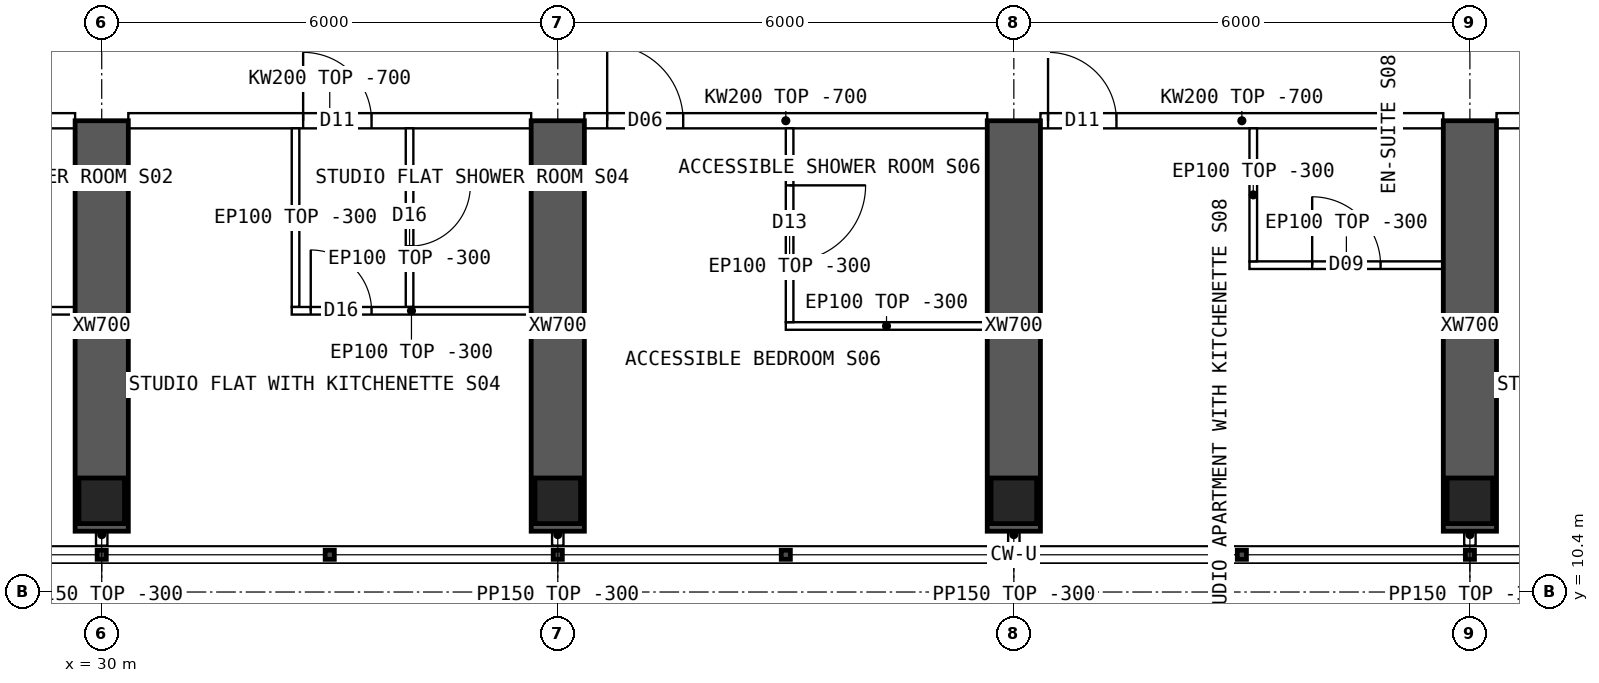
"""IFC4 building model, lengths in metres.
Left out: names, types, materials, properties, quantities, classifications, styles, units other than length and angle.
Written with IfcOpenShell. Run it as: python <this file> out.ifc"""

import sys

from ifc_helpers import new_model, si_unit, direction, frame, frame_2d, origin, origin_2d, place, context, subcontext, project, spatial, polyline, rectangle, hollow_rectangle, outline, extrude, element, fill, save


model = new_model("IFC4")
c1 = context("Model", 3, precision=1e-05, world=origin(), true_north=direction((0.0, 1.0)))
c2 = subcontext(c1, "Body", "Model", "MODEL_VIEW")
j1 = project(units=[si_unit("LENGTHUNIT", "METRE"), si_unit("PLANEANGLEUNIT", "RADIAN")], contexts=[c1])
p1 = place(None, origin())
s1 = spatial("IfcSite", under=j1, at=p1, CompositionType="ELEMENT")
p2 = place(p1, origin())
s2 = spatial("IfcBuilding", under=s1, at=p2, CompositionType="ELEMENT")
p3 = place(p2, frame((0.0, 0.0, 254.05)))
s3 = spatial("IfcBuildingStorey", under=s2, at=p3, CompositionType="ELEMENT", Elevation=254.05)
for number, where, z_axis, x_axis in (
    (1, (30.0, 11.6, 0.0), (0.0, 0.0, 1.0), (1.0, 0.0, 0.0)),
    (2, (36.0, 11.6, 0.0), (0.0, 0.0, 1.0), (1.0, 0.0, 0.0)),
    (3, (42.0, 11.6, 0.0), (0.0, 0.0, 1.0), (1.0, 0.0, 0.0)),
    (4, (48.0, 11.6, 0.0), (0.0, 0.0, 1.0), (1.0, 0.0, 0.0)),
):
    element("IfcColumn", number, at=place(p3, frame(where, z_axis=z_axis, x_axis=x_axis)), inside=s3, PredefinedType="COLUMN", context=c2, shape_type="SweptSolid", body=[
        extrude(hollow_rectangle(XDim=0.6, YDim=0.6, WallThickness=0.06, at=origin_2d()), origin(), (0.0, 0.0, 1.0), 3.75),
    ])
for number, where, z_axis, x_axis in (
    (5, (30.0, 11.2, 0.0), (0.0, 0.0, 1.0), (0.0, 1.0, 0.0)),
    (6, (36.0, 11.2, 0.0), (0.0, 0.0, 1.0), (0.0, 1.0, 0.0)),
    (7, (42.0, 11.2, 0.0), (0.0, 0.0, 1.0), (0.0, 1.0, 0.0)),
    (8, (48.0, 11.2, 0.0), (0.0, 0.0, 1.0), (0.0, 1.0, 0.0)),
):
    element("IfcWall", number, at=place(p3, frame(where, z_axis=z_axis, x_axis=x_axis)), inside=s3, PredefinedType="SHEAR", context=c2, shape_type="SweptSolid", body=[
        extrude(rectangle(XDim=5.4, YDim=0.7, at=frame_2d((2.7, 0.0))), origin(), (0.0, 0.0, 1.0), 3.75),
    ])
p4 = place(p3, frame((24.35, 16.6, 0.0), z_axis=(0.0, 0.0, 1.0), x_axis=(1.0, 0.0, 0.0)))
e9 = element("IfcWall", 9, at=p4, inside=s3, PredefinedType="SOLIDWALL", context=c2, shape_type="SweptSolid", body=[
    extrude(outline(polyline([(0.0, 0.0), (5.3, 0.0), (5.3, 3.05), (0.0, 3.05), (0.0, 0.0)])), frame((0.0, 0.1, 0.0), z_axis=(0.0, -1.0, 0.0), x_axis=(1.0, 0.0, 0.0)), (0.0, 0.0, 1.0), 0.2),
])
p5 = place(p4, frame((2.3, 0.0, 0.0)))
e10 = element("IfcOpeningElement", 10, at=p5, cuts=e9, PredefinedType="OPENING", context=c2, shape_type="SweptSolid", body=[
    extrude(rectangle(XDim=0.9, YDim=2.1, at=frame_2d((0.45, 1.05))), frame((0.0, 0.11, 0.0), z_axis=(0.0, -1.0, 0.0), x_axis=(1.0, 0.0, 0.0)), (0.0, 0.0, 1.0), 0.22),
])
p6 = place(p3, frame((30.35, 16.6, 0.0), z_axis=(0.0, 0.0, 1.0), x_axis=(1.0, 0.0, 0.0)))
e11 = element("IfcWall", 11, at=p6, inside=s3, PredefinedType="SOLIDWALL", context=c2, shape_type="SweptSolid", body=[
    extrude(outline(polyline([(0.0, 0.0), (5.3, 0.0), (5.3, 3.05), (0.0, 3.05), (0.0, 0.0)])), frame((0.0, 0.1, 0.0), z_axis=(0.0, -1.0, 0.0), x_axis=(1.0, 0.0, 0.0)), (0.0, 0.0, 1.0), 0.2),
])
p7 = place(p6, frame((2.3, 0.0, 0.0)))
e12 = element("IfcOpeningElement", 12, at=p7, cuts=e11, PredefinedType="OPENING", context=c2, shape_type="SweptSolid", body=[
    extrude(rectangle(XDim=0.9, YDim=2.1, at=frame_2d((0.45, 1.05))), frame((0.0, 0.11, 0.0), z_axis=(0.0, -1.0, 0.0), x_axis=(1.0, 0.0, 0.0)), (0.0, 0.0, 1.0), 0.22),
])
p8 = place(p3, frame((36.35, 16.6, 0.0), z_axis=(0.0, 0.0, 1.0), x_axis=(1.0, 0.0, 0.0)))
e13 = element("IfcWall", 13, at=p8, inside=s3, PredefinedType="SOLIDWALL", context=c2, shape_type="SweptSolid", body=[
    extrude(outline(polyline([(0.0, 0.0), (5.3, 0.0), (5.3, 3.05), (0.0, 3.05), (0.0, 0.0)])), frame((0.0, 0.1, 0.0), z_axis=(0.0, -1.0, 0.0), x_axis=(1.0, 0.0, 0.0)), (0.0, 0.0, 1.0), 0.2),
])
p9 = place(p8, frame((0.3, 0.0, 0.0)))
e14 = element("IfcOpeningElement", 14, at=p9, cuts=e13, PredefinedType="OPENING", context=c2, shape_type="SweptSolid", body=[
    extrude(rectangle(XDim=1.0, YDim=2.1, at=frame_2d((0.5, 1.05))), frame((0.0, 0.11, 0.0), z_axis=(0.0, -1.0, 0.0), x_axis=(1.0, 0.0, 0.0)), (0.0, 0.0, 1.0), 0.22),
])
p10 = place(p3, frame((42.35, 16.6, 0.0), z_axis=(0.0, 0.0, 1.0), x_axis=(1.0, 0.0, 0.0)))
e15 = element("IfcWall", 15, at=p10, inside=s3, PredefinedType="SOLIDWALL", context=c2, shape_type="SweptSolid", body=[
    extrude(outline(polyline([(0.0, 0.0), (5.3, 0.0), (5.3, 3.05), (0.0, 3.05), (0.0, 0.0)])), frame((0.0, 0.1, 0.0), z_axis=(0.0, -1.0, 0.0), x_axis=(1.0, 0.0, 0.0)), (0.0, 0.0, 1.0), 0.2),
])
p11 = place(p10, frame((0.1, 0.0, 0.0)))
e16 = element("IfcOpeningElement", 16, at=p11, cuts=e15, PredefinedType="OPENING", context=c2, shape_type="SweptSolid", body=[
    extrude(rectangle(XDim=0.9, YDim=2.1, at=frame_2d((0.45, 1.05))), frame((0.0, 0.11, 0.0), z_axis=(0.0, -1.0, 0.0), x_axis=(1.0, 0.0, 0.0)), (0.0, 0.0, 1.0), 0.22),
])
p12 = place(p3, frame((48.35, 16.6, 0.0), z_axis=(0.0, 0.0, 1.0), x_axis=(1.0, 0.0, 0.0)))
e17 = element("IfcWall", 17, at=p12, inside=s3, PredefinedType="SOLIDWALL", context=c2, shape_type="SweptSolid", body=[
    extrude(outline(polyline([(0.0, 0.0), (5.3, 0.0), (5.3, 3.05), (0.0, 3.05), (0.0, 0.0)])), frame((0.0, 0.1, 0.0), z_axis=(0.0, -1.0, 0.0), x_axis=(1.0, 0.0, 0.0)), (0.0, 0.0, 1.0), 0.2),
])
p13 = place(p12, frame((2.3, 0.0, 0.0)))
e18 = element("IfcOpeningElement", 18, at=p13, cuts=e17, PredefinedType="OPENING", context=c2, shape_type="SweptSolid", body=[
    extrude(rectangle(XDim=0.9, YDim=2.1, at=frame_2d((0.45, 1.05))), frame((0.0, 0.11, 0.0), z_axis=(0.0, -1.0, 0.0), x_axis=(1.0, 0.0, 0.0)), (0.0, 0.0, 1.0), 0.22),
])
p14 = place(p3, frame((29.65, 14.1, 0.0), z_axis=(0.0, 0.0, 1.0), x_axis=(-1.0, 0.0, 0.0)))
e19 = element("IfcWall", 19, at=p14, inside=s3, PredefinedType="PARTITIONING", context=c2, shape_type="SweptSolid", body=[
    extrude(rectangle(XDim=3.15, YDim=0.1, at=frame_2d((1.575, 0.0))), origin(), (0.0, 0.0, 1.0), 3.45),
])
p15 = place(p14, frame((2.1, 0.0, 0.0)))
e20 = element("IfcOpeningElement", 20, at=p15, cuts=e19, PredefinedType="OPENING", context=c2, shape_type="SweptSolid", body=[
    extrude(rectangle(XDim=0.8, YDim=2.1, at=frame_2d((0.4, 1.05))), frame((0.0, 0.06, 0.0), z_axis=(0.0, -1.0, 0.0), x_axis=(1.0, 0.0, 0.0)), (0.0, 0.0, 1.0), 0.12),
])
p16 = place(p3, frame((35.65, 14.1, 0.0), z_axis=(0.0, 0.0, 1.0), x_axis=(-1.0, 0.0, 0.0)))
e21 = element("IfcWall", 21, at=p16, inside=s3, PredefinedType="PARTITIONING", context=c2, shape_type="SweptSolid", body=[
    extrude(rectangle(XDim=3.15, YDim=0.1, at=frame_2d((1.575, 0.0))), origin(), (0.0, 0.0, 1.0), 3.45),
])
p17 = place(p16, frame((2.1, 0.0, 0.0)))
e22 = element("IfcOpeningElement", 22, at=p17, cuts=e21, PredefinedType="OPENING", context=c2, shape_type="SweptSolid", body=[
    extrude(rectangle(XDim=0.8, YDim=2.1, at=frame_2d((0.4, 1.05))), frame((0.0, 0.06, 0.0), z_axis=(0.0, -1.0, 0.0), x_axis=(1.0, 0.0, 0.0)), (0.0, 0.0, 1.0), 0.12),
])
p18 = place(p3, frame((32.55, 14.15, 0.0), z_axis=(0.0, 0.0, 1.0), x_axis=(0.0, 1.0, 0.0)))
e23 = element("IfcWall", 23, at=p18, inside=s3, PredefinedType="PARTITIONING", context=c2, shape_type="SweptSolid", body=[
    extrude(outline(polyline([(0.0, 0.0), (2.35, 0.0), (2.35, 3.05), (2.302, 3.05), (2.3, 3.45), (0.0, 3.45), (0.0, 0.0)])), frame((0.0, 0.05, 0.0), z_axis=(0.0, -1.0, 0.0), x_axis=(1.0, 0.0, 0.0)), (0.0, 0.0, 1.0), 0.1),
])
p19 = place(p3, frame((34.05, 14.15, 0.0), z_axis=(0.0, 0.0, 1.0), x_axis=(0.0, 1.0, 0.0)))
e24 = element("IfcWall", 24, at=p19, inside=s3, PredefinedType="PARTITIONING", context=c2, shape_type="SweptSolid", body=[
    extrude(outline(polyline([(0.0, 0.0), (2.35, 0.0), (2.35, 3.05), (2.302, 3.05), (2.3, 3.45), (0.0, 3.45), (0.0, 0.0)])), frame((0.0, 0.05, 0.0), z_axis=(0.0, -1.0, 0.0), x_axis=(1.0, 0.0, 0.0)), (0.0, 0.0, 1.0), 0.1),
])
p20 = place(p19, frame((0.8, 0.0, 0.0)))
e25 = element("IfcOpeningElement", 25, at=p20, cuts=e24, PredefinedType="OPENING", context=c2, shape_type="SweptSolid", body=[
    extrude(rectangle(XDim=0.8, YDim=2.1, at=frame_2d((0.4, 1.05))), frame((0.0, 0.06, 0.0), z_axis=(0.0, -1.0, 0.0), x_axis=(1.0, 0.0, 0.0)), (0.0, 0.0, 1.0), 0.12),
])
p21 = place(p3, frame((39.0, 13.9, 0.0), z_axis=(0.0, 0.0, 1.0), x_axis=(1.0, 0.0, 0.0)))
e26 = element("IfcWall", 26, at=p21, inside=s3, PredefinedType="PARTITIONING", context=c2, shape_type="SweptSolid", body=[
    extrude(rectangle(XDim=2.65, YDim=0.1, at=frame_2d((1.325, 0.0))), origin(), (0.0, 0.0, 1.0), 3.45),
])
p22 = place(p3, frame((39.05, 13.95, 0.0), z_axis=(0.0, 0.0, 1.0), x_axis=(0.0, 1.0, 0.0)))
e27 = element("IfcWall", 27, at=p22, inside=s3, PredefinedType="PARTITIONING", context=c2, shape_type="SweptSolid", body=[
    extrude(outline(polyline([(0.0, 0.0), (2.55, 0.0), (2.55, 3.05), (2.502, 3.05), (2.5, 3.45), (0.0, 3.45), (0.0, 0.0)])), frame((0.0, 0.05, 0.0), z_axis=(0.0, -1.0, 0.0), x_axis=(1.0, 0.0, 0.0)), (0.0, 0.0, 1.0), 0.1),
])
p23 = place(p22, frame((0.8, 0.0, 0.0)))
e28 = element("IfcOpeningElement", 28, at=p23, cuts=e27, PredefinedType="OPENING", context=c2, shape_type="SweptSolid", body=[
    extrude(rectangle(XDim=1.0, YDim=2.1, at=frame_2d((0.5, 1.05))), frame((0.0, 0.06, 0.0), z_axis=(0.0, -1.0, 0.0), x_axis=(1.0, 0.0, 0.0)), (0.0, 0.0, 1.0), 0.12),
])
p24 = place(p3, frame((47.65, 14.7, 0.0), z_axis=(0.0, 0.0, 1.0), x_axis=(-1.0, 0.0, 0.0)))
e29 = element("IfcWall", 29, at=p24, inside=s3, PredefinedType="PARTITIONING", context=c2, shape_type="SweptSolid", body=[
    extrude(rectangle(XDim=2.55, YDim=0.1, at=frame_2d((1.275, 0.0))), origin(), (0.0, 0.0, 1.0), 3.45),
])
p25 = place(p24, frame((0.825, 0.0, 0.0)))
e30 = element("IfcOpeningElement", 30, at=p25, cuts=e29, PredefinedType="OPENING", context=c2, shape_type="SweptSolid", body=[
    extrude(rectangle(XDim=0.9, YDim=2.1, at=frame_2d((0.45, 1.05))), frame((0.0, 0.06, 0.0), z_axis=(0.0, -1.0, 0.0), x_axis=(1.0, 0.0, 0.0)), (0.0, 0.0, 1.0), 0.12),
])
p26 = place(p3, frame((45.15, 14.75, 0.0), z_axis=(0.0, 0.0, 1.0), x_axis=(0.0, 1.0, 0.0)))
e31 = element("IfcWall", 31, at=p26, inside=s3, PredefinedType="PARTITIONING", context=c2, shape_type="SweptSolid", body=[
    extrude(outline(polyline([(0.0, 0.0), (1.75, 0.0), (1.75, 3.05), (1.702, 3.05), (1.7, 3.45), (0.0, 3.45), (0.0, 0.0)])), frame((0.0, 0.05, 0.0), z_axis=(0.0, -1.0, 0.0), x_axis=(1.0, 0.0, 0.0)), (0.0, 0.0, 1.0), 0.1),
])
for number, where, z_axis, x_axis in (
    (32, (30.0, 11.3, 0.0), (0.0, 0.0, 1.0), (0.0, -1.0, 0.0)),
    (33, (36.0, 11.3, 0.0), (0.0, 0.0, 1.0), (0.0, -1.0, 0.0)),
    (34, (42.0, 11.3, 0.0), (0.0, 0.0, 1.0), (0.0, -1.0, 0.0)),
    (35, (48.0, 11.3, 0.0), (0.0, 0.0, 1.0), (0.0, -1.0, 0.0)),
):
    element("IfcWall", number, at=place(p3, frame(where, z_axis=z_axis, x_axis=x_axis)), inside=s3, PredefinedType="PARTITIONING", context=c2, shape_type="SweptSolid", body=[
        extrude(rectangle(XDim=0.29, YDim=0.15, at=frame_2d((0.145, 0.0))), origin(), (0.0, 0.0, 1.0), 3.45),
    ])
p27 = place(p17, origin())
e36 = element("IfcDoor", 36, at=p27, inside=s3, OperationType="SINGLE_SWING_RIGHT", PredefinedType="DOOR", context=c2, shape_type="SweptSolid", body=[
    extrude(rectangle(XDim=0.8, YDim=2.1, at=frame_2d((0.4, 1.05))), frame((0.0, 0.025, 0.0), z_axis=(0.0, -1.0, 0.0), x_axis=(1.0, 0.0, 0.0)), (0.0, 0.0, 1.0), 0.05),
])
fill(e22, e36)
p28 = place(p20, origin())
e37 = element("IfcDoor", 37, at=p28, inside=s3, OperationType="SINGLE_SWING_RIGHT", PredefinedType="DOOR", context=c2, shape_type="SweptSolid", body=[
    extrude(rectangle(XDim=0.8, YDim=2.1, at=frame_2d((0.4, 1.05))), frame((0.0, 0.025, 0.0), z_axis=(0.0, -1.0, 0.0), x_axis=(1.0, 0.0, 0.0)), (0.0, 0.0, 1.0), 0.05),
])
fill(e25, e37)
p29 = place(p7, origin())
e38 = element("IfcDoor", 38, at=p29, inside=s3, OperationType="SINGLE_SWING_LEFT", PredefinedType="DOOR", context=c2, shape_type="SweptSolid", body=[
    extrude(rectangle(XDim=0.9, YDim=2.1, at=frame_2d((0.45, 1.05))), frame((0.0, 0.025, 0.0), z_axis=(0.0, -1.0, 0.0), x_axis=(1.0, 0.0, 0.0)), (0.0, 0.0, 1.0), 0.05),
])
fill(e12, e38)
p30 = place(p23, origin())
e39 = element("IfcDoor", 39, at=p30, inside=s3, OperationType="SINGLE_SWING_RIGHT", PredefinedType="DOOR", context=c2, shape_type="SweptSolid", body=[
    extrude(rectangle(XDim=1.0, YDim=2.1, at=frame_2d((0.5, 1.05))), frame((0.0, 0.025, 0.0), z_axis=(0.0, -1.0, 0.0), x_axis=(1.0, 0.0, 0.0)), (0.0, 0.0, 1.0), 0.05),
])
fill(e28, e39)
p31 = place(p9, origin())
e40 = element("IfcDoor", 40, at=p31, inside=s3, OperationType="SINGLE_SWING_LEFT", PredefinedType="DOOR", context=c2, shape_type="SweptSolid", body=[
    extrude(rectangle(XDim=1.0, YDim=2.1, at=frame_2d((0.5, 1.05))), frame((0.0, 0.025, 0.0), z_axis=(0.0, -1.0, 0.0), x_axis=(1.0, 0.0, 0.0)), (0.0, 0.0, 1.0), 0.05),
])
fill(e14, e40)
p32 = place(p25, origin())
e41 = element("IfcDoor", 41, at=p32, inside=s3, OperationType="SINGLE_SWING_RIGHT", PredefinedType="DOOR", context=c2, shape_type="SweptSolid", body=[
    extrude(rectangle(XDim=0.9, YDim=2.1, at=frame_2d((0.45, 1.05))), frame((0.0, 0.025, 0.0), z_axis=(0.0, -1.0, 0.0), x_axis=(1.0, 0.0, 0.0)), (0.0, 0.0, 1.0), 0.05),
])
fill(e30, e41)
p33 = place(p11, origin())
e42 = element("IfcDoor", 42, at=p33, inside=s3, OperationType="SINGLE_SWING_LEFT", PredefinedType="DOOR", context=c2, shape_type="SweptSolid", body=[
    extrude(rectangle(XDim=0.9, YDim=2.1, at=frame_2d((0.45, 1.05))), frame((0.0, 0.025, 0.0), z_axis=(0.0, -1.0, 0.0), x_axis=(1.0, 0.0, 0.0)), (0.0, 0.0, 1.0), 0.05),
])
fill(e16, e42)
save(model, sys.argv[1])
